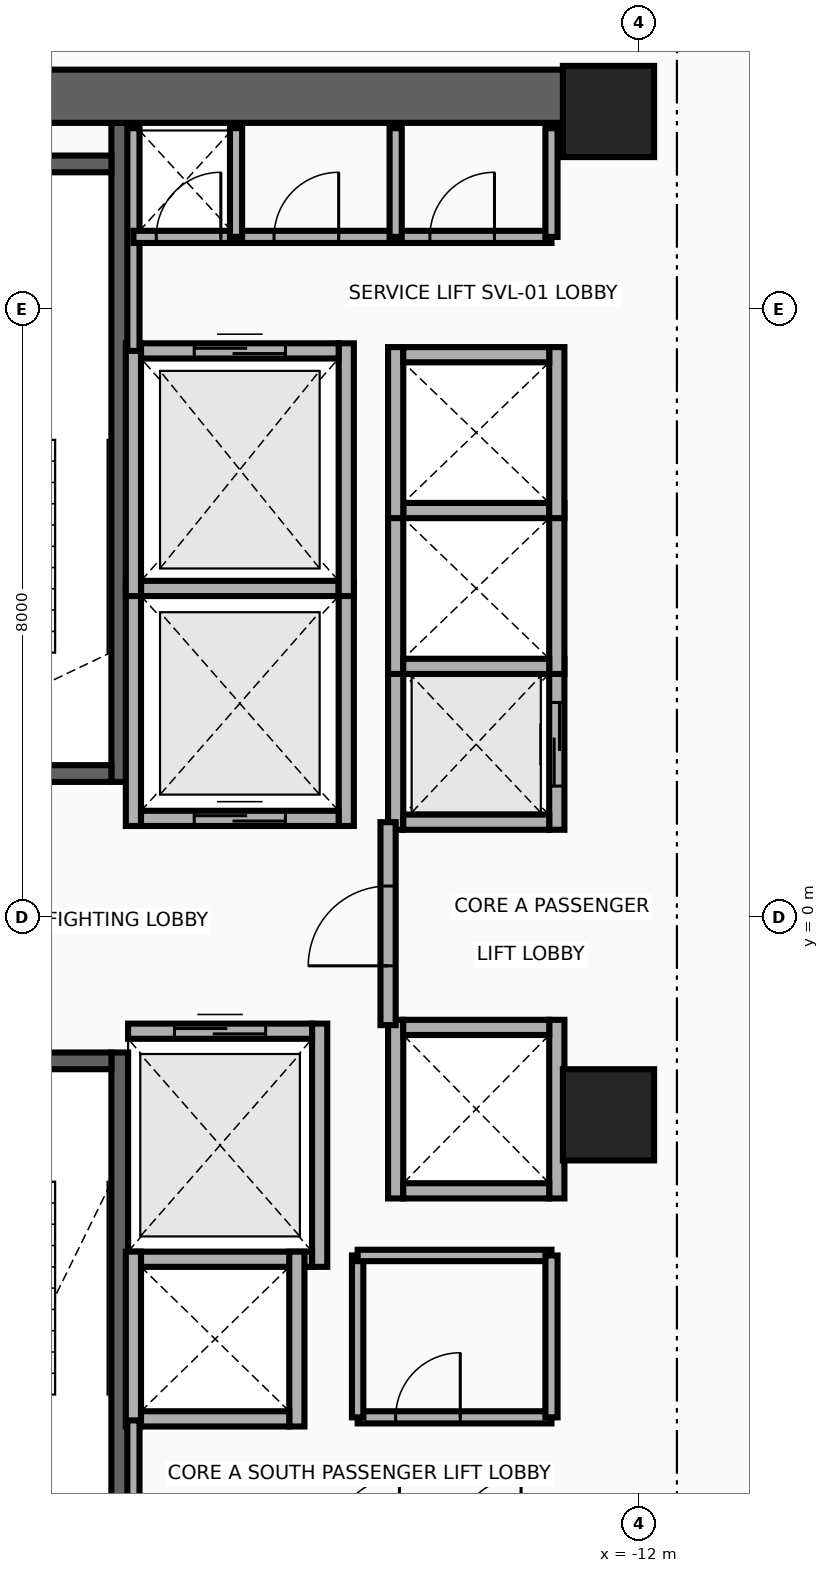
"""IFC4 building model, lengths in metres.
Left out: names, types, materials, properties, quantities, classifications, styles, units other than length and angle.
Written with IfcOpenShell. Run it as: python <this file> out.ifc"""

import sys

from ifc_helpers import new_model, si_unit, direction, frame, frame_2d, origin, origin_2d, place, context, subcontext, project, spatial, rectangle, extrude, source, transform, mapped, element, fill, save


model = new_model("IFC4")
c1 = context("Model", 3, precision=1e-05, world=origin(), true_north=direction((0.0, 1.0)))
c2 = subcontext(c1, "Body", "Model", "MODEL_VIEW")
j1 = project(units=[si_unit("LENGTHUNIT", "METRE"), si_unit("PLANEANGLEUNIT", "RADIAN")], contexts=[c1])
p1 = place(None, origin())
s1 = spatial("IfcSite", under=j1, at=p1, CompositionType="ELEMENT")
p2 = place(p1, origin())
s2 = spatial("IfcBuilding", under=s1, at=p2, CompositionType="ELEMENT")
p3 = place(p2, frame((0.0, 0.0, 131.6)))
s3 = spatial("IfcBuildingStorey", under=s2, at=p3, CompositionType="ELEMENT", Elevation=131.6)
p4 = place(p3, frame((-18.83, 1.78, 0.0), z_axis=(0.0, 0.0, 1.0), x_axis=(0.0, 1.0, 0.0)))
e1 = element("IfcWall", 1, at=p4, inside=s3, PredefinedType="SHEAR", context=c2, shape_type="SweptSolid", body=[
    extrude(rectangle(XDim=8.67, YDim=0.22, at=frame_2d((4.335, 0.0))), origin(), (0.0, 0.0, 1.0), 3.46),
])
p5 = place(p3, frame((-22.05, 1.89, 0.0), z_axis=(0.0, 0.0, 1.0), x_axis=(1.0, 0.0, 0.0)))
e2 = element("IfcWall", 2, at=p5, inside=s3, PredefinedType="SHEAR", context=c2, shape_type="SweptSolid", body=[
    extrude(rectangle(XDim=3.11, YDim=0.22, at=frame_2d((1.555, 0.0))), origin(), (0.0, 0.0, 1.0), 3.46),
])
p6 = place(p5, frame((1.0, 0.0, 0.0)))
e3 = element("IfcOpeningElement", 3, at=p6, cuts=e2, PredefinedType="OPENING", context=c2, shape_type="SweptSolid", body=[
    extrude(rectangle(XDim=1.1, YDim=2.15, at=frame_2d((0.55, 1.075))), frame((0.0, 0.125, 0.0), z_axis=(0.0, -1.0, 0.0), x_axis=(1.0, 0.0, 0.0)), (0.0, 0.0, 1.0), 0.25),
])
p7 = place(p3, frame((-22.05, 9.91, 0.0), z_axis=(0.0, 0.0, 1.0), x_axis=(1.0, 0.0, 0.0)))
e4 = element("IfcWall", 4, at=p7, inside=s3, PredefinedType="SHEAR", context=c2, shape_type="SweptSolid", body=[
    extrude(rectangle(XDim=3.11, YDim=0.22, at=frame_2d((1.555, 0.0))), origin(), (0.0, 0.0, 1.0), 3.46),
])
p8 = place(p3, frame((-18.83, -10.45, 0.0), z_axis=(0.0, 0.0, 1.0), x_axis=(0.0, 1.0, 0.0)))
e5 = element("IfcWall", 5, at=p8, inside=s3, PredefinedType="SHEAR", context=c2, shape_type="SweptSolid", body=[
    extrude(rectangle(XDim=8.67, YDim=0.22, at=frame_2d((4.335, 0.0))), origin(), (0.0, 0.0, 1.0), 3.46),
])
p9 = place(p3, frame((-22.05, -1.89, 0.0), z_axis=(0.0, 0.0, 1.0), x_axis=(1.0, 0.0, 0.0)))
e6 = element("IfcWall", 6, at=p9, inside=s3, PredefinedType="SHEAR", context=c2, shape_type="SweptSolid", body=[
    extrude(rectangle(XDim=3.11, YDim=0.22, at=frame_2d((1.555, 0.0))), origin(), (0.0, 0.0, 1.0), 3.46),
])
p10 = place(p9, frame((1.0, 0.0, 0.0)))
e7 = element("IfcOpeningElement", 7, at=p10, cuts=e6, PredefinedType="OPENING", context=c2, shape_type="SweptSolid", body=[
    extrude(rectangle(XDim=1.1, YDim=2.15, at=frame_2d((0.55, 1.075))), frame((0.0, 0.125, 0.0), z_axis=(0.0, -1.0, 0.0), x_axis=(1.0, 0.0, 0.0)), (0.0, 0.0, 1.0), 0.25),
])
p11 = place(p3, frame((-22.65, 10.8, 0.0), z_axis=(0.0, 0.0, 1.0), x_axis=(1.0, 0.0, 0.0)))
e8 = element("IfcWall", 8, at=p11, inside=s3, PredefinedType="SHEAR", context=c2, shape_type="SweptSolid", body=[
    extrude(rectangle(XDim=10.25, YDim=0.7, at=frame_2d((5.125, 0.0))), origin(), (0.0, 0.0, 1.0), 3.46),
])
m1 = source(origin(), c2, "Body", "SweptSolid", [
    extrude(rectangle(XDim=1.2, YDim=1.2, at=origin_2d()), origin(), (0.0, 0.0, 1.0), 3.7),
])
for number, where, z_axis, x_axis in (
    (9, (-12.4, -2.6, 0.0), (0.0, 0.0, 1.0), (1.0, 0.0, 0.0)),
    (10, (-12.4, 10.6, 0.0), (0.0, 0.0, 1.0), (1.0, 0.0, 0.0)),
):
    element("IfcColumn", number, at=place(p3, frame(where, z_axis=z_axis, x_axis=x_axis)), inside=s3, PredefinedType="COLUMN", context=c2, shape_type="MappedRepresentation", body=[
        mapped(m1, transform((0.0, 0.0, 0.0), x_axis=(1.0, 0.0, 0.0), y_axis=(0.0, 1.0, 0.0), z_axis=(0.0, 0.0, 1.0), scale=1.0)),
    ])
for number, where, z_axis, x_axis in (
    (11, (-18.65, 1.2, 0.0), (0.0, 0.0, 1.0), (0.0, 1.0, 0.0)),
    (12, (-15.85, 1.2, 0.0), (0.0, 0.0, 1.0), (0.0, 1.0, 0.0)),
):
    element("IfcWall", number, at=place(p3, frame(where, z_axis=z_axis, x_axis=x_axis)), inside=s3, PredefinedType="MOVABLE", context=c2, shape_type="SweptSolid", body=[
        extrude(rectangle(XDim=3.225, YDim=0.2, at=frame_2d((1.613, 0.0))), origin(), (0.0, 0.0, 1.0), 3.46),
    ])
p12 = place(p3, frame((-18.55, 1.3, 0.0), z_axis=(0.0, 0.0, 1.0), x_axis=(1.0, 0.0, 0.0)))
e13 = element("IfcWall", 13, at=p12, inside=s3, PredefinedType="MOVABLE", context=c2, shape_type="SweptSolid", body=[
    extrude(rectangle(XDim=2.6, YDim=0.2, at=frame_2d((1.3, 0.0))), origin(), (0.0, 0.0, 1.0), 3.46),
])
p13 = place(p12, frame((0.7, 0.0, 0.0)))
e14 = element("IfcOpeningElement", 14, at=p13, cuts=e13, PredefinedType="OPENING", context=c2, shape_type="SweptSolid", body=[
    extrude(rectangle(XDim=1.2, YDim=2.1, at=frame_2d((0.6, 1.05))), frame((0.0, 0.115, 0.0), z_axis=(0.0, -1.0, 0.0), x_axis=(1.0, 0.0, 0.0)), (0.0, 0.0, 1.0), 0.23),
])
p14 = place(p3, frame((-18.55, 4.325, 0.0), z_axis=(0.0, 0.0, 1.0), x_axis=(1.0, 0.0, 0.0)))
e15 = element("IfcWall", 15, at=p14, inside=s3, PredefinedType="MOVABLE", context=c2, shape_type="SweptSolid", body=[
    extrude(rectangle(XDim=2.6, YDim=0.2, at=frame_2d((1.3, 0.0))), origin(), (0.0, 0.0, 1.0), 3.46),
])
p15 = place(p3, frame((-16.2, -4.6, 0.0), z_axis=(0.0, 0.0, 1.0), x_axis=(0.0, 1.0, 0.0)))
e16 = element("IfcWall", 16, at=p15, inside=s3, PredefinedType="MOVABLE", context=c2, shape_type="SweptSolid", body=[
    extrude(rectangle(XDim=3.2, YDim=0.2, at=frame_2d((1.6, 0.0))), origin(), (0.0, 0.0, 1.0), 3.46),
])
p16 = place(p3, frame((-18.72, -4.5, 0.0), z_axis=(0.0, 0.0, 1.0), x_axis=(1.0, 0.0, 0.0)))
e17 = element("IfcWall", 17, at=p16, inside=s3, PredefinedType="MOVABLE", context=c2, shape_type="SweptSolid", body=[
    extrude(rectangle(XDim=2.42, YDim=0.2, at=frame_2d((1.21, 0.0))), origin(), (0.0, 0.0, 1.0), 3.46),
])
p17 = place(p3, frame((-18.72, -1.5, 0.0), z_axis=(0.0, 0.0, 1.0), x_axis=(1.0, 0.0, 0.0)))
e18 = element("IfcWall", 18, at=p17, inside=s3, PredefinedType="MOVABLE", context=c2, shape_type="SweptSolid", body=[
    extrude(rectangle(XDim=2.42, YDim=0.2, at=frame_2d((1.21, 0.0))), origin(), (0.0, 0.0, 1.0), 3.46),
])
p18 = place(p17, frame((0.61, 0.0, 0.0)))
e19 = element("IfcOpeningElement", 19, at=p18, cuts=e18, PredefinedType="OPENING", context=c2, shape_type="SweptSolid", body=[
    extrude(rectangle(XDim=1.2, YDim=2.1, at=frame_2d((0.6, 1.05))), frame((0.0, 0.115, 0.0), z_axis=(0.0, -1.0, 0.0), x_axis=(1.0, 0.0, 0.0)), (0.0, 0.0, 1.0), 0.23),
])
for number, where, z_axis, x_axis in (
    (20, (-18.65, 4.225, 0.0), (0.0, 0.0, 1.0), (0.0, 1.0, 0.0)),
    (21, (-15.85, 4.225, 0.0), (0.0, 0.0, 1.0), (0.0, 1.0, 0.0)),
):
    element("IfcWall", number, at=place(p3, frame(where, z_axis=z_axis, x_axis=x_axis)), inside=s3, PredefinedType="MOVABLE", context=c2, shape_type="SweptSolid", body=[
        extrude(rectangle(XDim=3.325, YDim=0.2, at=frame_2d((1.663, 0.0))), origin(), (0.0, 0.0, 1.0), 3.46),
    ])
p19 = place(p3, frame((-18.55, 7.45, 0.0), z_axis=(0.0, 0.0, 1.0), x_axis=(1.0, 0.0, 0.0)))
e22 = element("IfcWall", 22, at=p19, inside=s3, PredefinedType="MOVABLE", context=c2, shape_type="SweptSolid", body=[
    extrude(rectangle(XDim=2.6, YDim=0.2, at=frame_2d((1.3, 0.0))), origin(), (0.0, 0.0, 1.0), 3.46),
])
p20 = place(p19, frame((0.7, 0.0, 0.0)))
e23 = element("IfcOpeningElement", 23, at=p20, cuts=e22, PredefinedType="OPENING", context=c2, shape_type="SweptSolid", body=[
    extrude(rectangle(XDim=1.2, YDim=2.1, at=frame_2d((0.6, 1.05))), frame((0.0, 0.115, 0.0), z_axis=(0.0, -1.0, 0.0), x_axis=(1.0, 0.0, 0.0)), (0.0, 0.0, 1.0), 0.23),
])
p21 = place(p3, frame((-15.2, 1.15, 0.0), z_axis=(0.0, 0.0, 1.0), x_axis=(0.0, 1.0, 0.0)))
e24 = element("IfcWall", 24, at=p21, inside=s3, PredefinedType="MOVABLE", context=c2, shape_type="SweptSolid", body=[
    extrude(rectangle(XDim=2.25, YDim=0.2, at=frame_2d((1.125, 0.0))), origin(), (0.0, 0.0, 1.0), 3.46),
])
p22 = place(p3, frame((-13.08, 1.15, 0.0), z_axis=(0.0, 0.0, 1.0), x_axis=(0.0, 1.0, 0.0)))
e25 = element("IfcWall", 25, at=p22, inside=s3, PredefinedType="MOVABLE", context=c2, shape_type="SweptSolid", body=[
    extrude(rectangle(XDim=2.25, YDim=0.2, at=frame_2d((1.125, 0.0))), origin(), (0.0, 0.0, 1.0), 3.46),
])
p23 = place(p22, frame((0.575, 0.0, 0.0)))
e26 = element("IfcOpeningElement", 26, at=p23, cuts=e25, PredefinedType="OPENING", context=c2, shape_type="SweptSolid", body=[
    extrude(rectangle(XDim=1.1, YDim=2.1, at=frame_2d((0.55, 1.05))), frame((0.0, 0.115, 0.0), z_axis=(0.0, -1.0, 0.0), x_axis=(1.0, 0.0, 0.0)), (0.0, 0.0, 1.0), 0.23),
])
p24 = place(p3, frame((-15.1, 1.25, 0.0), z_axis=(0.0, 0.0, 1.0), x_axis=(1.0, 0.0, 0.0)))
e27 = element("IfcWall", 27, at=p24, inside=s3, PredefinedType="MOVABLE", context=c2, shape_type="SweptSolid", body=[
    extrude(rectangle(XDim=1.92, YDim=0.2, at=frame_2d((0.96, 0.0))), origin(), (0.0, 0.0, 1.0), 3.46),
])
for number, where, z_axis, x_axis in (
    (28, (-15.2, 3.2, 0.0), (0.0, 0.0, 1.0), (0.0, 1.0, 0.0)),
    (29, (-13.08, 3.2, 0.0), (0.0, 0.0, 1.0), (0.0, 1.0, 0.0)),
):
    element("IfcWall", number, at=place(p3, frame(where, z_axis=z_axis, x_axis=x_axis)), inside=s3, PredefinedType="MOVABLE", context=c2, shape_type="SweptSolid", body=[
        extrude(rectangle(XDim=2.25, YDim=0.2, at=frame_2d((1.125, 0.0))), origin(), (0.0, 0.0, 1.0), 3.46),
    ])
for number, where, z_axis, x_axis in (
    (30, (-15.1, 3.3, 0.0), (0.0, 0.0, 1.0), (1.0, 0.0, 0.0)),
    (31, (-15.1, 5.35, 0.0), (0.0, 0.0, 1.0), (1.0, 0.0, 0.0)),
):
    element("IfcWall", number, at=place(p3, frame(where, z_axis=z_axis, x_axis=x_axis)), inside=s3, PredefinedType="MOVABLE", context=c2, shape_type="SweptSolid", body=[
        extrude(rectangle(XDim=1.92, YDim=0.2, at=frame_2d((0.96, 0.0))), origin(), (0.0, 0.0, 1.0), 3.46),
    ])
for number, where, z_axis, x_axis in (
    (32, (-15.2, 5.25, 0.0), (0.0, 0.0, 1.0), (0.0, 1.0, 0.0)),
    (33, (-13.08, 5.25, 0.0), (0.0, 0.0, 1.0), (0.0, 1.0, 0.0)),
):
    element("IfcWall", number, at=place(p3, frame(where, z_axis=z_axis, x_axis=x_axis)), inside=s3, PredefinedType="MOVABLE", context=c2, shape_type="SweptSolid", body=[
        extrude(rectangle(XDim=2.25, YDim=0.2, at=frame_2d((1.125, 0.0))), origin(), (0.0, 0.0, 1.0), 3.46),
    ])
p25 = place(p3, frame((-15.1, 7.4, 0.0), z_axis=(0.0, 0.0, 1.0), x_axis=(1.0, 0.0, 0.0)))
e34 = element("IfcWall", 34, at=p25, inside=s3, PredefinedType="MOVABLE", context=c2, shape_type="SweptSolid", body=[
    extrude(rectangle(XDim=1.92, YDim=0.2, at=frame_2d((0.96, 0.0))), origin(), (0.0, 0.0, 1.0), 3.46),
])
for number, where, z_axis, x_axis in (
    (35, (-18.65, -6.7, 0.0), (0.0, 0.0, 1.0), (0.0, 1.0, 0.0)),
    (36, (-16.5, -6.7, 0.0), (0.0, 0.0, 1.0), (0.0, 1.0, 0.0)),
):
    element("IfcWall", number, at=place(p3, frame(where, z_axis=z_axis, x_axis=x_axis)), inside=s3, PredefinedType="MOVABLE", context=c2, shape_type="SweptSolid", body=[
        extrude(rectangle(XDim=2.3, YDim=0.2, at=frame_2d((1.15, 0.0))), origin(), (0.0, 0.0, 1.0), 3.46),
    ])
p26 = place(p3, frame((-18.55, -6.6, 0.0), z_axis=(0.0, 0.0, 1.0), x_axis=(1.0, 0.0, 0.0)))
e37 = element("IfcWall", 37, at=p26, inside=s3, PredefinedType="MOVABLE", context=c2, shape_type="SweptSolid", body=[
    extrude(rectangle(XDim=1.95, YDim=0.2, at=frame_2d((0.975, 0.0))), origin(), (0.0, 0.0, 1.0), 3.46),
])
for number, where, z_axis, x_axis in (
    (38, (-15.2, -3.7, 0.0), (0.0, 0.0, 1.0), (0.0, 1.0, 0.0)),
    (39, (-13.08, -3.7, 0.0), (0.0, 0.0, 1.0), (0.0, 1.0, 0.0)),
):
    element("IfcWall", number, at=place(p3, frame(where, z_axis=z_axis, x_axis=x_axis)), inside=s3, PredefinedType="MOVABLE", context=c2, shape_type="SweptSolid", body=[
        extrude(rectangle(XDim=2.35, YDim=0.2, at=frame_2d((1.175, 0.0))), origin(), (0.0, 0.0, 1.0), 3.46),
    ])
for number, where, z_axis, x_axis in (
    (40, (-15.1, -3.6, 0.0), (0.0, 0.0, 1.0), (1.0, 0.0, 0.0)),
    (41, (-15.1, -1.45, 0.0), (0.0, 0.0, 1.0), (1.0, 0.0, 0.0)),
):
    element("IfcWall", number, at=place(p3, frame(where, z_axis=z_axis, x_axis=x_axis)), inside=s3, PredefinedType="MOVABLE", context=c2, shape_type="SweptSolid", body=[
        extrude(rectangle(XDim=1.92, YDim=0.2, at=frame_2d((0.96, 0.0))), origin(), (0.0, 0.0, 1.0), 3.46),
    ])
p27 = place(p3, frame((-15.3, -1.42, 0.0), z_axis=(0.0, 0.0, 1.0), x_axis=(0.0, 1.0, 0.0)))
e42 = element("IfcWall", 42, at=p27, inside=s3, PredefinedType="PARTITIONING", context=c2, shape_type="SweptSolid", body=[
    extrude(rectangle(XDim=2.67, YDim=0.2, at=frame_2d((1.335, 0.0))), origin(), (0.0, 0.0, 1.0), 3.46),
])
p28 = place(p27, frame((0.78, 0.0, 0.0)))
e43 = element("IfcOpeningElement", 43, at=p28, cuts=e42, PredefinedType="OPENING", context=c2, shape_type="SweptSolid", body=[
    extrude(rectangle(XDim=1.05, YDim=2.15, at=frame_2d((0.525, 1.075))), frame((0.0, 0.115, 0.0), z_axis=(0.0, -1.0, 0.0), x_axis=(1.0, 0.0, 0.0)), (0.0, 0.0, 1.0), 0.23),
])
p29 = place(p3, frame((-18.65, 7.45, 0.0), z_axis=(0.0, 0.0, 1.0), x_axis=(0.0, 1.0, 0.0)))
e44 = element("IfcWall", 44, at=p29, inside=s3, PredefinedType="PARTITIONING", context=c2, shape_type="SweptSolid", body=[
    extrude(rectangle(XDim=2.93, YDim=0.16, at=frame_2d((1.465, 0.0))), origin(), (0.0, 0.0, 1.0), 3.46),
])
p30 = place(p3, frame((-18.65, -8.18, 0.0), z_axis=(0.0, 0.0, 1.0), x_axis=(0.0, 1.0, 0.0)))
e45 = element("IfcWall", 45, at=p30, inside=s3, PredefinedType="PARTITIONING", context=c2, shape_type="SweptSolid", body=[
    extrude(rectangle(XDim=1.56, YDim=0.16, at=frame_2d((0.78, 0.0))), origin(), (0.0, 0.0, 1.0), 3.46),
])
p31 = place(p3, frame((-18.65, 8.95, 0.0), z_axis=(0.0, 0.0, 1.0), x_axis=(1.0, 0.0, 0.0)))
e46 = element("IfcWall", 46, at=p31, inside=s3, PredefinedType="PARTITIONING", context=c2, shape_type="SweptSolid", body=[
    extrude(rectangle(XDim=5.5, YDim=0.16, at=frame_2d((2.75, 0.0))), origin(), (0.0, 0.0, 1.0), 3.46),
])
p32 = place(p31, frame((0.3, 0.0, 0.0)))
e47 = element("IfcOpeningElement", 47, at=p32, cuts=e46, PredefinedType="OPENING", context=c2, shape_type="SweptSolid", body=[
    extrude(rectangle(XDim=0.85, YDim=2.05, at=frame_2d((0.425, 1.025))), frame((0.0, 0.095, 0.0), z_axis=(0.0, -1.0, 0.0), x_axis=(1.0, 0.0, 0.0)), (0.0, 0.0, 1.0), 0.19),
])
p33 = place(p31, frame((1.85, 0.0, 0.0)))
e48 = element("IfcOpeningElement", 48, at=p33, cuts=e46, PredefinedType="OPENING", context=c2, shape_type="SweptSolid", body=[
    extrude(rectangle(XDim=0.85, YDim=2.05, at=frame_2d((0.425, 1.025))), frame((0.0, 0.095, 0.0), z_axis=(0.0, -1.0, 0.0), x_axis=(1.0, 0.0, 0.0)), (0.0, 0.0, 1.0), 0.19),
])
p34 = place(p31, frame((3.9, 0.0, 0.0)))
e49 = element("IfcOpeningElement", 49, at=p34, cuts=e46, PredefinedType="OPENING", context=c2, shape_type="SweptSolid", body=[
    extrude(rectangle(XDim=0.85, YDim=2.05, at=frame_2d((0.425, 1.025))), frame((0.0, 0.095, 0.0), z_axis=(0.0, -1.0, 0.0), x_axis=(1.0, 0.0, 0.0)), (0.0, 0.0, 1.0), 0.19),
])
for number, where, z_axis, x_axis in (
    (50, (-13.15, 8.95, 0.0), (0.0, 0.0, 1.0), (0.0, 1.0, 0.0)),
    (51, (-17.3, 8.95, 0.0), (0.0, 0.0, 1.0), (0.0, 1.0, 0.0)),
    (52, (-15.2, 8.95, 0.0), (0.0, 0.0, 1.0), (0.0, 1.0, 0.0)),
):
    element("IfcWall", number, at=place(p3, frame(where, z_axis=z_axis, x_axis=x_axis)), inside=s3, PredefinedType="PARTITIONING", context=c2, shape_type="SweptSolid", body=[
        extrude(rectangle(XDim=1.43, YDim=0.16, at=frame_2d((0.715, 0.0))), origin(), (0.0, 0.0, 1.0), 3.46),
    ])
p35 = place(p3, frame((-15.7, -6.58, 0.0), z_axis=(0.0, 0.0, 1.0), x_axis=(1.0, 0.0, 0.0)))
e53 = element("IfcWall", 53, at=p35, inside=s3, PredefinedType="PARTITIONING", context=c2, shape_type="SweptSolid", body=[
    extrude(rectangle(XDim=2.55, YDim=0.16, at=frame_2d((1.275, 0.0))), origin(), (0.0, 0.0, 1.0), 3.46),
])
p36 = place(p35, frame((0.5, 0.0, 0.0)))
e54 = element("IfcOpeningElement", 54, at=p36, cuts=e53, PredefinedType="OPENING", context=c2, shape_type="SweptSolid", body=[
    extrude(rectangle(XDim=0.85, YDim=2.05, at=frame_2d((0.425, 1.025))), frame((0.0, 0.095, 0.0), z_axis=(0.0, -1.0, 0.0), x_axis=(1.0, 0.0, 0.0)), (0.0, 0.0, 1.0), 0.19),
])
p37 = place(p3, frame((-15.7, -6.58, 0.0), z_axis=(0.0, 0.0, 1.0), x_axis=(0.0, 1.0, 0.0)))
e55 = element("IfcWall", 55, at=p37, inside=s3, PredefinedType="PARTITIONING", context=c2, shape_type="SweptSolid", body=[
    extrude(rectangle(XDim=2.13, YDim=0.15, at=frame_2d((1.065, 0.0))), origin(), (0.0, 0.0, 1.0), 3.46),
])
p38 = place(p3, frame((-15.7, -4.45, 0.0), z_axis=(0.0, 0.0, 1.0), x_axis=(1.0, 0.0, 0.0)))
e56 = element("IfcWall", 56, at=p38, inside=s3, PredefinedType="PARTITIONING", context=c2, shape_type="SweptSolid", body=[
    extrude(rectangle(XDim=2.55, YDim=0.15, at=frame_2d((1.275, 0.0))), origin(), (0.0, 0.0, 1.0), 3.46),
])
p39 = place(p3, frame((-13.15, -6.58, 0.0), z_axis=(0.0, 0.0, 1.0), x_axis=(0.0, 1.0, 0.0)))
e57 = element("IfcWall", 57, at=p39, inside=s3, PredefinedType="PARTITIONING", context=c2, shape_type="SweptSolid", body=[
    extrude(rectangle(XDim=2.13, YDim=0.16, at=frame_2d((1.065, 0.0))), origin(), (0.0, 0.0, 1.0), 3.46),
])
p40 = place(p13, origin())
e58 = element("IfcDoor", 58, at=p40, inside=s3, OperationType="DOUBLE_DOOR_SLIDING", PredefinedType="DOOR", context=c2, shape_type="SweptSolid", body=[
    extrude(rectangle(XDim=1.2, YDim=2.1, at=frame_2d((0.6, 1.05))), frame((0.0, 0.025, 0.0), z_axis=(0.0, -1.0, 0.0), x_axis=(1.0, 0.0, 0.0)), (0.0, 0.0, 1.0), 0.05),
])
fill(e14, e58)
p41 = place(p18, origin())
e59 = element("IfcDoor", 59, at=p41, inside=s3, OperationType="DOUBLE_DOOR_SLIDING", PredefinedType="DOOR", context=c2, shape_type="SweptSolid", body=[
    extrude(rectangle(XDim=1.2, YDim=2.1, at=frame_2d((0.6, 1.05))), frame((0.0, 0.025, 0.0), z_axis=(0.0, -1.0, 0.0), x_axis=(1.0, 0.0, 0.0)), (0.0, 0.0, 1.0), 0.05),
])
fill(e19, e59)
p42 = place(p20, origin())
e60 = element("IfcDoor", 60, at=p42, inside=s3, OperationType="DOUBLE_DOOR_SLIDING", PredefinedType="DOOR", context=c2, shape_type="SweptSolid", body=[
    extrude(rectangle(XDim=1.2, YDim=2.1, at=frame_2d((0.6, 1.05))), frame((0.0, 0.025, 0.0), z_axis=(0.0, -1.0, 0.0), x_axis=(1.0, 0.0, 0.0)), (0.0, 0.0, 1.0), 0.05),
])
fill(e23, e60)
p43 = place(p23, origin())
e61 = element("IfcDoor", 61, at=p43, inside=s3, OperationType="DOUBLE_DOOR_SLIDING", PredefinedType="DOOR", context=c2, shape_type="SweptSolid", body=[
    extrude(rectangle(XDim=1.1, YDim=2.1, at=frame_2d((0.55, 1.05))), frame((0.0, 0.025, 0.0), z_axis=(0.0, -1.0, 0.0), x_axis=(1.0, 0.0, 0.0)), (0.0, 0.0, 1.0), 0.05),
])
fill(e26, e61)
p44 = place(p28, origin())
e62 = element("IfcDoor", 62, at=p44, inside=s3, OperationType="SINGLE_SWING_RIGHT", PredefinedType="DOOR", context=c2, shape_type="SweptSolid", body=[
    extrude(rectangle(XDim=1.05, YDim=2.15, at=frame_2d((0.525, 1.075))), frame((0.0, 0.025, 0.0), z_axis=(0.0, -1.0, 0.0), x_axis=(1.0, 0.0, 0.0)), (0.0, 0.0, 1.0), 0.05),
])
fill(e43, e62)
p45 = place(p32, origin())
e63 = element("IfcDoor", 63, at=p45, inside=s3, OperationType="SINGLE_SWING_LEFT", PredefinedType="DOOR", context=c2, shape_type="SweptSolid", body=[
    extrude(rectangle(XDim=0.85, YDim=2.05, at=frame_2d((0.425, 1.025))), frame((0.0, 0.025, 0.0), z_axis=(0.0, -1.0, 0.0), x_axis=(1.0, 0.0, 0.0)), (0.0, 0.0, 1.0), 0.05),
])
fill(e47, e63)
p46 = place(p33, origin())
e64 = element("IfcDoor", 64, at=p46, inside=s3, OperationType="SINGLE_SWING_RIGHT", PredefinedType="DOOR", context=c2, shape_type="SweptSolid", body=[
    extrude(rectangle(XDim=0.85, YDim=2.05, at=frame_2d((0.425, 1.025))), frame((0.0, 0.025, 0.0), z_axis=(0.0, -1.0, 0.0), x_axis=(1.0, 0.0, 0.0)), (0.0, 0.0, 1.0), 0.05),
])
fill(e48, e64)
p47 = place(p34, origin())
e65 = element("IfcDoor", 65, at=p47, inside=s3, OperationType="SINGLE_SWING_LEFT", PredefinedType="DOOR", context=c2, shape_type="SweptSolid", body=[
    extrude(rectangle(XDim=0.85, YDim=2.05, at=frame_2d((0.425, 1.025))), frame((0.0, 0.025, 0.0), z_axis=(0.0, -1.0, 0.0), x_axis=(1.0, 0.0, 0.0)), (0.0, 0.0, 1.0), 0.05),
])
fill(e49, e65)
p48 = place(p36, origin())
e66 = element("IfcDoor", 66, at=p48, inside=s3, OperationType="SINGLE_SWING_RIGHT", PredefinedType="DOOR", context=c2, shape_type="SweptSolid", body=[
    extrude(rectangle(XDim=0.85, YDim=2.05, at=frame_2d((0.425, 1.025))), frame((0.0, 0.025, 0.0), z_axis=(0.0, -1.0, 0.0), x_axis=(1.0, 0.0, 0.0)), (0.0, 0.0, 1.0), 0.05),
])
fill(e54, e66)
save(model, sys.argv[1])
